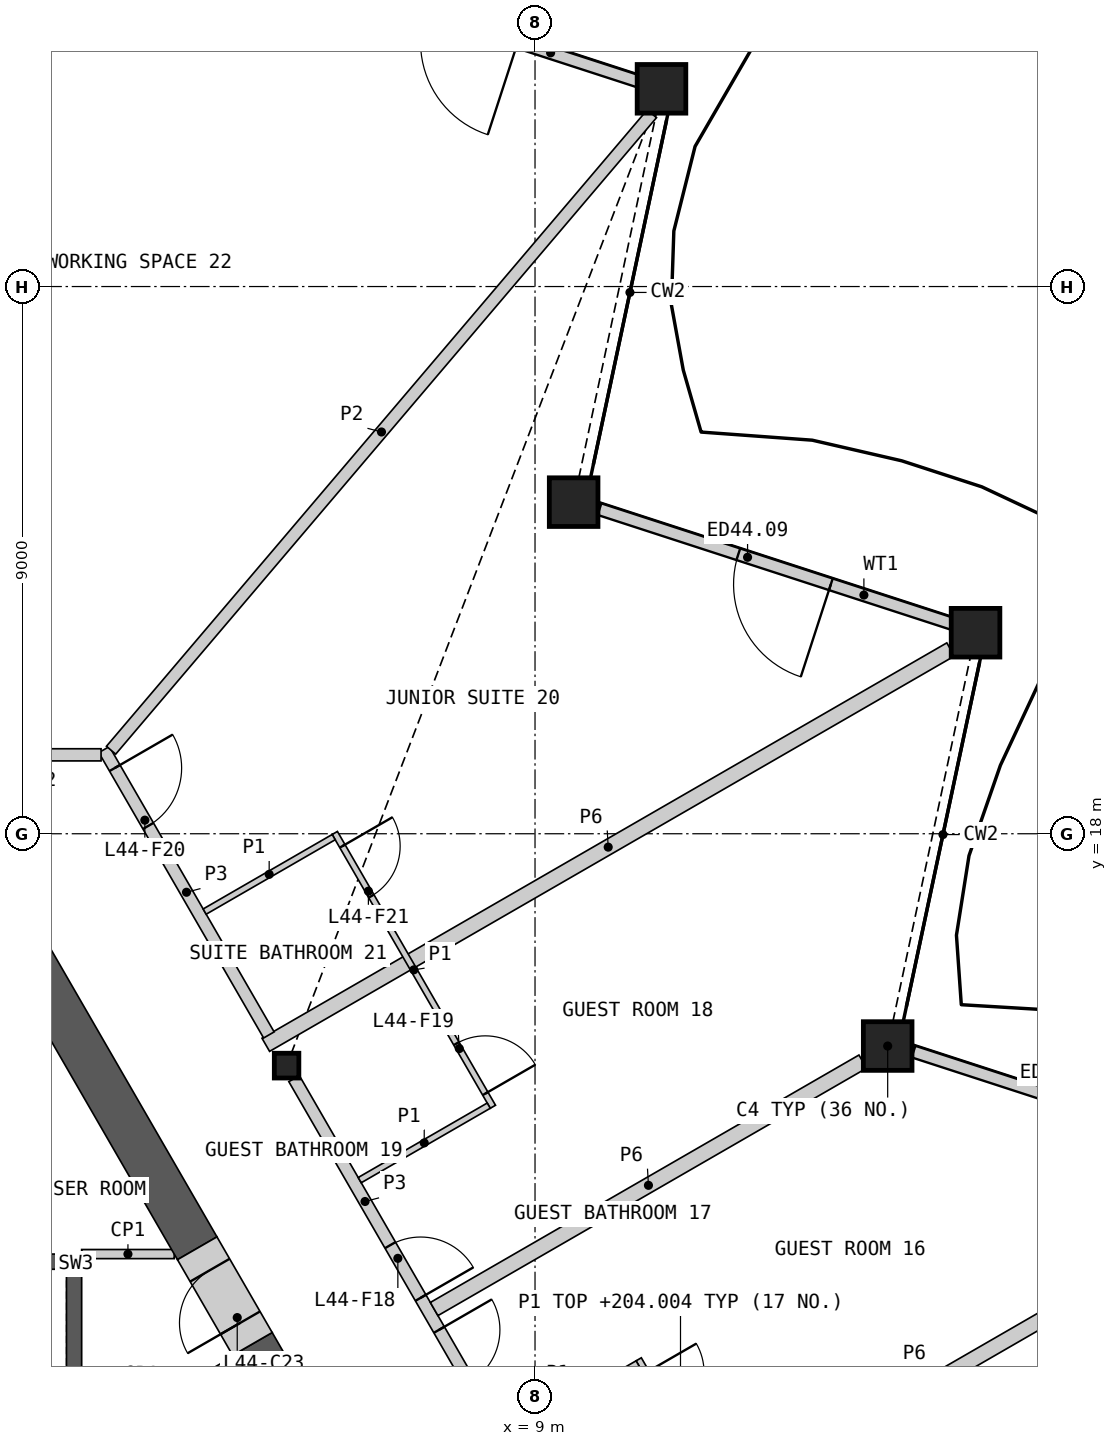
"""IFC4 building model, lengths in metres.
Left out: names, types, materials, properties, quantities, classifications, styles, units other than length and angle.
Written with IfcOpenShell. Run it as: python <this file> out.ifc"""

import sys

from ifc_helpers import new_model, si_unit, direction, frame, frame_2d, origin, origin_2d, place, context, subcontext, project, spatial, polyline, rectangle, hollow_rectangle, i_section, outline, extrude, element, fill, save


model = new_model("IFC4")
c1 = context("Model", 3, precision=1e-05, world=origin(), true_north=direction((0.0, 1.0)))
c2 = subcontext(c1, "Body", "Model", "MODEL_VIEW")
j1 = project(units=[si_unit("LENGTHUNIT", "METRE"), si_unit("PLANEANGLEUNIT", "RADIAN")], contexts=[c1])
p1 = place(None, origin())
s1 = spatial("IfcSite", under=j1, at=p1, CompositionType="ELEMENT")
p2 = place(p1, origin())
s2 = spatial("IfcBuilding", under=s1, at=p2, CompositionType="ELEMENT")
p3 = place(p2, frame((0.0, 0.0, 201.6)))
s3 = spatial("IfcBuildingStorey", under=s2, at=p3, CompositionType="ELEMENT", Elevation=201.6)
for number, where, z_axis, x_axis in (
    (1, (14.8, 14.508, 0.0), (0.0, 0.0, 1.0), (1.0, 0.0, 0.0)),
    (2, (16.245, 21.306, 0.0), (0.0, 0.0, 1.0), (1.0, 0.0, 0.0)),
    (3, (9.635, 23.454, 0.0), (0.0, 0.0, 1.0), (1.0, 0.0, 0.0)),
    (4, (11.08, 30.252, 0.0), (0.0, 0.0, 1.0), (1.0, 0.0, 0.0)),
):
    element("IfcColumn", number, at=place(p3, frame(where, z_axis=z_axis, x_axis=x_axis)), inside=s3, PredefinedType="COLUMN", context=c2, shape_type="SweptSolid", body=[
        extrude(hollow_rectangle(XDim=0.8, YDim=0.8, WallThickness=0.05, at=origin_2d()), origin(), (0.0, 0.0, 1.0), 3.6),
    ])
p4 = place(p3, frame((4.914, 14.186, 0.0), z_axis=(0.0, 0.0, 1.0), x_axis=(1.0, 0.0, 0.0)))
e5 = element("IfcColumn", 5, at=p4, inside=s3, PredefinedType="COLUMN", context=c2, shape_type="SweptSolid", body=[
    extrude(i_section(OverallWidth=0.404, OverallDepth=0.407, WebThickness=0.027, FlangeThickness=0.044, at=origin_2d()), origin(), (0.0, 0.0, 1.0), 3.6),
])
p5 = place(p3, frame((21.006, 12.538, 0.0), z_axis=(0.0, 0.0, 1.0), x_axis=(-0.951049709595, 0.309037942458, 0.0)))
e6 = element("IfcWall", 6, at=p5, inside=s3, PredefinedType="SOLIDWALL", context=c2, shape_type="SweptSolid", body=[
    extrude(rectangle(XDim=6.079, YDim=0.2, at=frame_2d((3.04, 0.0))), origin(), (0.0, 0.0, 1.0), 2.701),
])
p6 = place(p5, frame((2.096, 0.0, 0.0)))
e7 = element("IfcOpeningElement", 7, at=p6, cuts=e6, PredefinedType="OPENING", context=c2, shape_type="SweptSolid", body=[
    extrude(rectangle(XDim=1.6, YDim=2.4, at=frame_2d((0.8, 1.2))), frame((0.0, 0.11, 0.0), z_axis=(0.0, -1.0, 0.0), x_axis=(1.0, 0.0, 0.0)), (0.0, 0.0, 1.0), 0.22),
])
p7 = place(p3, frame((15.858, 21.455, 0.0), z_axis=(0.0, 0.0, 1.0), x_axis=(-0.951066434465, 0.308986467719, 0.0)))
e8 = element("IfcWall", 8, at=p7, inside=s3, PredefinedType="SOLIDWALL", context=c2, shape_type="SweptSolid", body=[
    extrude(rectangle(XDim=6.097, YDim=0.2, at=frame_2d((3.048, 0.0))), origin(), (0.0, 0.0, 1.0), 2.701),
])
p8 = place(p7, frame((2.096, 0.0, 0.0)))
e9 = element("IfcOpeningElement", 9, at=p8, cuts=e8, PredefinedType="OPENING", context=c2, shape_type="SweptSolid", body=[
    extrude(rectangle(XDim=1.6, YDim=2.4, at=frame_2d((0.8, 1.2))), frame((0.0, 0.11, 0.0), z_axis=(0.0, -1.0, 0.0), x_axis=(1.0, 0.0, 0.0)), (0.0, 0.0, 1.0), 0.22),
])
p9 = place(p3, frame((10.71, 30.371, 0.0), z_axis=(0.0, 0.0, 1.0), x_axis=(-0.951055780789, 0.30901925802, 0.0)))
e10 = element("IfcWall", 10, at=p9, inside=s3, PredefinedType="SOLIDWALL", context=c2, shape_type="SweptSolid", body=[
    extrude(rectangle(XDim=6.114, YDim=0.2, at=frame_2d((3.057, 0.0))), origin(), (0.0, 0.0, 1.0), 2.701),
])
p10 = place(p9, frame((2.096, 0.0, 0.0)))
e11 = element("IfcOpeningElement", 11, at=p10, cuts=e10, PredefinedType="OPENING", context=c2, shape_type="SweptSolid", body=[
    extrude(rectangle(XDim=1.6, YDim=2.4, at=frame_2d((0.8, 1.2))), frame((0.0, 0.11, 0.0), z_axis=(0.0, -1.0, 0.0), x_axis=(1.0, 0.0, 0.0)), (0.0, 0.0, 1.0), 0.22),
])
p11 = place(p3, origin())
e12 = element("IfcWall", 12, at=p11, inside=s3, PredefinedType="SHEAR", context=c2, shape_type="SweptSolid", body=[
    extrude(outline(polyline([(1.544, 5.237), (1.544, 11.087), (1.294, 10.837), (1.294, 5.237), (1.544, 5.237)])), origin(), (0.0, 0.0, 1.0), 3.25),
])
p12 = place(p3, origin())
e13 = element("IfcWall", 13, at=p12, inside=s3, PredefinedType="SHEAR", context=c2, shape_type="SweptSolid", body=[
    extrude(outline(polyline([(1.544, 11.087), (-1.544, 11.087), (-1.294, 10.837), (1.294, 10.837), (1.544, 11.087)])), origin(), (0.0, 0.0, 1.0), 3.25),
])
p13 = place(p3, frame((4.075, 9.339, 0.0), z_axis=(0.0, 0.0, 1.0), x_axis=(-0.865995658863, -0.500051516177, 0.0)))
e14 = element("IfcWall", 14, at=p13, inside=s3, PredefinedType="PARTITIONING", context=c2, shape_type="SweptSolid", body=[
    extrude(rectangle(XDim=2.933, YDim=0.15, at=frame_2d((1.466, 0.0))), origin(), (0.0, 0.0, 1.0), 3.25),
])
p14 = place(p3, frame((1.544, 11.087, 0.0), z_axis=(0.0, 0.0, 1.0), x_axis=(1.0, 0.0, 0.0)))
e15 = element("IfcWall", 15, at=p14, inside=s3, PredefinedType="PARTITIONING", context=c2, shape_type="SweptSolid", body=[
    extrude(rectangle(XDim=1.522, YDim=0.15, at=frame_2d((0.761, 0.0))), origin(), (0.0, 0.0, 1.0), 3.25),
])
p15 = place(p3, frame((3.444, 11.182, 0.0), z_axis=(0.0, 0.0, 1.0), x_axis=(-0.499985517215, 0.866033765263, 0.0)))
e16 = element("IfcWall", 16, at=p15, inside=s3, PredefinedType="SHEAR", context=c2, shape_type="SweptSolid", body=[
    extrude(rectangle(XDim=6.24, YDim=0.75, at=frame_2d((3.12, 0.0))), origin(), (0.0, 0.0, 1.0), 3.25),
])
p16 = place(p3, frame((5.906, 6.918, 0.0), z_axis=(0.0, 0.0, 1.0), x_axis=(-0.500017123375, 0.866015517374, 0.0)))
e17 = element("IfcWall", 17, at=p16, inside=s3, PredefinedType="SHEAR", context=c2, shape_type="SweptSolid", body=[
    extrude(rectangle(XDim=3.108, YDim=0.75, at=frame_2d((1.554, 0.0))), origin(), (0.0, 0.0, 1.0), 3.25),
])
p17 = place(p3, frame((4.353, 9.609, 0.0), z_axis=(0.0, 0.0, 1.0), x_axis=(-0.500071537347, 0.865984097738, 0.0)))
e18 = element("IfcWall", 18, at=p17, inside=s3, PredefinedType="SHEAR", context=c2, shape_type="SweptSolid", body=[
    extrude(rectangle(XDim=1.816, YDim=0.75, at=frame_2d((0.908, 0.0))), origin(), (0.0, 0.0, 1.0), 3.25),
])
p18 = place(p17, frame((0.4, 0.0, 0.0)))
e19 = element("IfcOpeningElement", 19, at=p18, cuts=e18, PredefinedType="OPENING", context=c2, shape_type="SweptSolid", body=[
    extrude(rectangle(XDim=1.0, YDim=2.1, at=frame_2d((0.5, 1.05))), frame((0.0, 0.385, 0.0), z_axis=(0.0, -1.0, 0.0), x_axis=(1.0, 0.0, 0.0)), (0.0, 0.0, 1.0), 0.77),
])
p19 = place(p3, frame((4.572, 14.529, 0.0), z_axis=(0.0, 0.0, 1.0), x_axis=(0.866023333059, 0.500003586584, 0.0)))
e20 = element("IfcWall", 20, at=p19, inside=s3, PredefinedType="PARTITIONING", context=c2, shape_type="SweptSolid", body=[
    extrude(rectangle(XDim=13.005, YDim=0.25, at=frame_2d((6.502, 0.0))), origin(), (0.0, 0.0, 1.0), 2.404),
])
p20 = place(p3, frame((10.042, 5.798, 0.0), z_axis=(0.0, 0.0, 1.0), x_axis=(0.866025883649, 0.499999168849, 0.0)))
e21 = element("IfcWall", 21, at=p20, inside=s3, PredefinedType="PARTITIONING", context=c2, shape_type="SweptSolid", body=[
    extrude(rectangle(XDim=12.652, YDim=0.25, at=frame_2d((6.326, 0.0))), origin(), (0.0, 0.0, 1.0), 2.404),
])
p21 = place(p3, frame((5.038, 13.972, 0.0), z_axis=(0.0, 0.0, 1.0), x_axis=(0.50000393355, -0.866023132736, 0.0)))
e22 = element("IfcWall", 22, at=p21, inside=s3, PredefinedType="PARTITIONING", context=c2, shape_type="SweptSolid", body=[
    extrude(rectangle(XDim=9.335, YDim=0.2, at=frame_2d((4.667, 0.0))), origin(), (0.0, 0.0, 1.0), 3.25),
])
p22 = place(p21, frame((4.77, 0.0, 0.0)))
e23 = element("IfcOpeningElement", 23, at=p22, cuts=e22, PredefinedType="OPENING", context=c2, shape_type="SweptSolid", body=[
    extrude(rectangle(XDim=1.0, YDim=2.1, at=frame_2d((0.5, 1.05))), frame((0.0, 0.11, 0.0), z_axis=(0.0, -1.0, 0.0), x_axis=(1.0, 0.0, 0.0)), (0.0, 0.0, 1.0), 0.22),
])
p23 = place(p21, frame((3.163, 0.0, 0.0)))
e24 = element("IfcOpeningElement", 24, at=p23, cuts=e22, PredefinedType="OPENING", context=c2, shape_type="SweptSolid", body=[
    extrude(rectangle(XDim=1.0, YDim=2.1, at=frame_2d((0.5, 1.05))), frame((0.0, 0.11, 0.0), z_axis=(0.0, -1.0, 0.0), x_axis=(1.0, 0.0, 0.0)), (0.0, 0.0, 1.0), 0.22),
])
p24 = place(p3, frame((7.341, 10.183, 0.0), z_axis=(0.0, 0.0, 1.0), x_axis=(0.866028741424, 0.499994218994, 0.0)))
e25 = element("IfcWall", 25, at=p24, inside=s3, PredefinedType="PARTITIONING", context=c2, shape_type="SweptSolid", body=[
    extrude(rectangle(XDim=8.139, YDim=0.25, at=frame_2d((4.07, 0.0))), origin(), (0.0, 0.0, 1.0), 2.404),
])
p25 = place(p3, frame((1.913, 19.385, 0.0), z_axis=(0.0, 0.0, 1.0), x_axis=(0.499961611314, -0.866047566368, 0.0)))
e26 = element("IfcWall", 26, at=p25, inside=s3, PredefinedType="PARTITIONING", context=c2, shape_type="SweptSolid", body=[
    extrude(rectangle(XDim=5.42, YDim=0.2, at=frame_2d((2.71, 0.0))), origin(), (0.0, 0.0, 1.0), 3.25),
])
p26 = place(p25, frame((0.351, 0.0, 0.0)))
e27 = element("IfcOpeningElement", 27, at=p26, cuts=e26, PredefinedType="OPENING", context=c2, shape_type="SweptSolid", body=[
    extrude(rectangle(XDim=1.1, YDim=2.1, at=frame_2d((0.55, 1.05))), frame((0.0, 0.11, 0.0), z_axis=(0.0, -1.0, 0.0), x_axis=(1.0, 0.0, 0.0)), (0.0, 0.0, 1.0), 0.22),
])
p27 = place(p3, frame((-1.863, 19.298, 0.0), z_axis=(0.0, 0.0, 1.0), x_axis=(1.0, 0.0, 0.0)))
e28 = element("IfcWall", 28, at=p27, inside=s3, PredefinedType="PARTITIONING", context=c2, shape_type="SweptSolid", body=[
    extrude(rectangle(XDim=3.726, YDim=0.2, at=frame_2d((1.863, 0.0))), origin(), (0.0, 0.0, 1.0), 3.25),
])
p28 = place(p27, frame((0.963, 0.0, 0.0)))
e29 = element("IfcOpeningElement", 29, at=p28, cuts=e28, PredefinedType="OPENING", context=c2, shape_type="SweptSolid", body=[
    extrude(rectangle(XDim=1.8, YDim=2.1, at=frame_2d((0.9, 1.05))), frame((0.0, 0.11, 0.0), z_axis=(0.0, -1.0, 0.0), x_axis=(1.0, 0.0, 0.0)), (0.0, 0.0, 1.0), 0.22),
])
p29 = place(p3, frame((2.028, 19.374, 0.0), z_axis=(0.0, 0.0, 1.0), x_axis=(0.647497756192, 0.762067356423, 0.0)))
e30 = element("IfcWall", 30, at=p29, inside=s3, PredefinedType="PARTITIONING", context=c2, shape_type="SweptSolid", body=[
    extrude(rectangle(XDim=13.736, YDim=0.2, at=frame_2d((6.868, 0.0))), origin(), (0.0, 0.0, 1.0), 2.404),
])
p30 = place(p3, frame((10.705, 9.356, 0.0), z_axis=(0.0, 0.0, 1.0), x_axis=(0.500015767406, -0.866016300277, 0.0)))
e31 = element("IfcWall", 31, at=p30, inside=s3, PredefinedType="PARTITIONING", context=c2, shape_type="SweptSolid", body=[
    extrude(rectangle(XDim=5.5, YDim=0.1, at=frame_2d((2.75, 0.0))), origin(), (0.0, 0.0, 1.0), 2.404),
])
p31 = place(p30, frame((4.3, 0.0, 0.0)))
e32 = element("IfcOpeningElement", 32, at=p31, cuts=e31, PredefinedType="OPENING", context=c2, shape_type="SweptSolid", body=[
    extrude(rectangle(XDim=0.95, YDim=2.1, at=frame_2d((0.475, 1.05))), frame((0.0, 0.06, 0.0), z_axis=(0.0, -1.0, 0.0), x_axis=(1.0, 0.0, 0.0)), (0.0, 0.0, 1.0), 0.12),
])
p32 = place(p30, frame((0.25, 0.0, 0.0)))
e33 = element("IfcOpeningElement", 33, at=p32, cuts=e31, PredefinedType="OPENING", context=c2, shape_type="SweptSolid", body=[
    extrude(rectangle(XDim=0.95, YDim=2.1, at=frame_2d((0.475, 1.05))), frame((0.0, 0.06, 0.0), z_axis=(0.0, -1.0, 0.0), x_axis=(1.0, 0.0, 0.0)), (0.0, 0.0, 1.0), 0.12),
])
p33 = place(p3, frame((5.707, 18.013, 0.0), z_axis=(0.0, 0.0, 1.0), x_axis=(0.500006934395, -0.866021400173, 0.0)))
e34 = element("IfcWall", 34, at=p33, inside=s3, PredefinedType="PARTITIONING", context=c2, shape_type="SweptSolid", body=[
    extrude(rectangle(XDim=5.2, YDim=0.1, at=frame_2d((2.6, 0.0))), origin(), (0.0, 0.0, 1.0), 2.404),
])
p34 = place(p33, frame((4.0, 0.0, 0.0)))
e35 = element("IfcOpeningElement", 35, at=p34, cuts=e34, PredefinedType="OPENING", context=c2, shape_type="SweptSolid", body=[
    extrude(rectangle(XDim=0.95, YDim=2.1, at=frame_2d((0.475, 1.05))), frame((0.0, 0.06, 0.0), z_axis=(0.0, -1.0, 0.0), x_axis=(1.0, 0.0, 0.0)), (0.0, 0.0, 1.0), 0.12),
])
p35 = place(p33, frame((0.25, 0.0, 0.0)))
e36 = element("IfcOpeningElement", 36, at=p35, cuts=e34, PredefinedType="OPENING", context=c2, shape_type="SweptSolid", body=[
    extrude(rectangle(XDim=0.95, YDim=2.1, at=frame_2d((0.475, 1.05))), frame((0.0, 0.06, 0.0), z_axis=(0.0, -1.0, 0.0), x_axis=(1.0, 0.0, 0.0)), (0.0, 0.0, 1.0), 0.12),
])
for number, where, z_axis, x_axis in (
    (37, (6.117, 12.303, 0.0), (0.0, 0.0, 1.0), (0.866, 0.5, 0.0)),
    (38, (3.567, 16.719, 0.0), (0.0, 0.0, 1.0), (0.866, 0.5, 0.0)),
):
    element("IfcWall", number, at=place(p3, frame(where, z_axis=z_axis, x_axis=x_axis)), inside=s3, PredefinedType="PARTITIONING", context=c2, shape_type="SweptSolid", body=[
        extrude(rectangle(XDim=2.45, YDim=0.1, at=frame_2d((1.225, 0.0))), origin(), (0.0, 0.0, 1.0), 2.404),
    ])
p36 = place(p3, frame((8.565, 8.063, 0.0), z_axis=(0.0, 0.0, 1.0), x_axis=(0.866032905446, 0.499987006516, 0.0)))
e39 = element("IfcWall", 39, at=p36, inside=s3, PredefinedType="PARTITIONING", context=c2, shape_type="SweptSolid", body=[
    extrude(rectangle(XDim=2.45, YDim=0.1, at=frame_2d((1.225, 0.0))), origin(), (0.0, 0.0, 1.0), 2.404),
])
p37 = place(p8, origin())
e40 = element("IfcDoor", 40, at=p37, inside=s3, OperationType="DOUBLE_DOOR_SINGLE_SWING", PredefinedType="DOOR", context=c2, shape_type="SweptSolid", body=[
    extrude(rectangle(XDim=1.6, YDim=2.4, at=frame_2d((0.8, 1.2))), frame((0.0, 0.025, 0.0), z_axis=(0.0, -1.0, 0.0), x_axis=(1.0, 0.0, 0.0)), (0.0, 0.0, 1.0), 0.05),
])
fill(e9, e40)
p38 = place(p18, origin())
e41 = element("IfcDoor", 41, at=p38, inside=s3, OperationType="SINGLE_SWING_LEFT", PredefinedType="DOOR", context=c2, shape_type="SweptSolid", body=[
    extrude(rectangle(XDim=1.0, YDim=2.1, at=frame_2d((0.5, 1.05))), frame((0.0, 0.13, 0.0), z_axis=(0.0, -1.0, 0.0), x_axis=(1.0, 0.0, 0.0)), (0.0, 0.0, 1.0), 0.05),
])
fill(e19, e41)
p39 = place(p22, origin())
e42 = element("IfcDoor", 42, at=p39, inside=s3, OperationType="SINGLE_SWING_LEFT", PredefinedType="DOOR", context=c2, shape_type="SweptSolid", body=[
    extrude(rectangle(XDim=1.0, YDim=2.1, at=frame_2d((0.5, 1.05))), frame((0.0, 0.025, 0.0), z_axis=(0.0, -1.0, 0.0), x_axis=(1.0, 0.0, 0.0)), (0.0, 0.0, 1.0), 0.05),
])
fill(e23, e42)
p40 = place(p23, origin())
e43 = element("IfcDoor", 43, at=p40, inside=s3, OperationType="SINGLE_SWING_RIGHT", PredefinedType="DOOR", context=c2, shape_type="SweptSolid", body=[
    extrude(rectangle(XDim=1.0, YDim=2.1, at=frame_2d((0.5, 1.05))), frame((0.0, 0.025, 0.0), z_axis=(0.0, -1.0, 0.0), x_axis=(1.0, 0.0, 0.0)), (0.0, 0.0, 1.0), 0.05),
])
fill(e24, e43)
p41 = place(p34, origin())
e44 = element("IfcDoor", 44, at=p41, inside=s3, OperationType="SINGLE_SWING_RIGHT", PredefinedType="DOOR", context=c2, shape_type="SweptSolid", body=[
    extrude(rectangle(XDim=0.95, YDim=2.1, at=frame_2d((0.475, 1.05))), frame((0.0, 0.025, 0.0), z_axis=(0.0, -1.0, 0.0), x_axis=(1.0, 0.0, 0.0)), (0.0, 0.0, 1.0), 0.05),
])
fill(e35, e44)
p42 = place(p26, origin())
e45 = element("IfcDoor", 45, at=p42, inside=s3, OperationType="SINGLE_SWING_LEFT", PredefinedType="DOOR", context=c2, shape_type="SweptSolid", body=[
    extrude(rectangle(XDim=1.1, YDim=2.1, at=frame_2d((0.55, 1.05))), frame((0.0, 0.025, 0.0), z_axis=(0.0, -1.0, 0.0), x_axis=(1.0, 0.0, 0.0)), (0.0, 0.0, 1.0), 0.05),
])
fill(e27, e45)
p43 = place(p35, origin())
e46 = element("IfcDoor", 46, at=p43, inside=s3, OperationType="SINGLE_SWING_LEFT", PredefinedType="DOOR", context=c2, shape_type="SweptSolid", body=[
    extrude(rectangle(XDim=0.95, YDim=2.1, at=frame_2d((0.475, 1.05))), frame((0.0, 0.025, 0.0), z_axis=(0.0, -1.0, 0.0), x_axis=(1.0, 0.0, 0.0)), (0.0, 0.0, 1.0), 0.05),
])
fill(e36, e46)
save(model, sys.argv[1])
